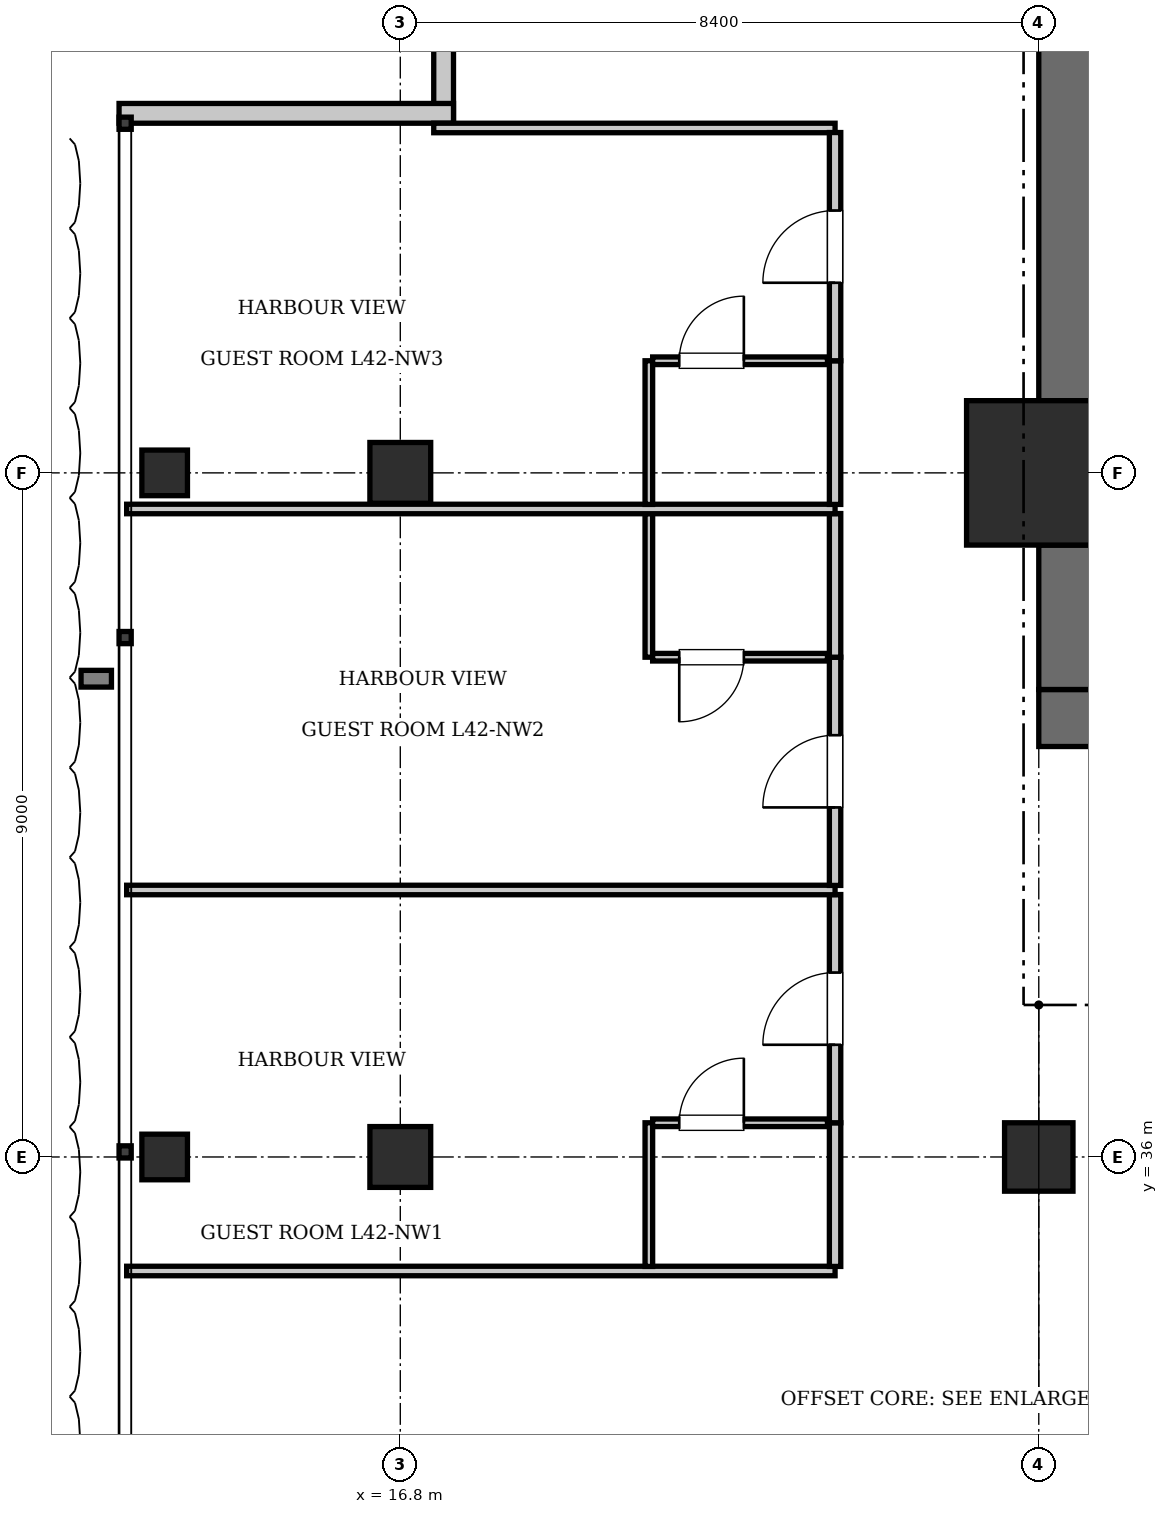
"""IFC4 building model, lengths in metres.
Left out: names, types, materials, properties, quantities, classifications, styles, units other than length and angle.
Written with IfcOpenShell. Run it as: python <this file> out.ifc"""

import sys

from ifc_helpers import new_model, si_unit, direction, frame, frame_2d, origin, origin_2d, place, context, subcontext, project, spatial, rectangle, i_section, extrude, element, fill, save


model = new_model("IFC4")
c1 = context("Model", 3, precision=1e-05, world=origin(), true_north=direction((0.0, 1.0)))
c2 = subcontext(c1, "Body", "Model", "MODEL_VIEW")
j1 = project(units=[si_unit("LENGTHUNIT", "METRE"), si_unit("PLANEANGLEUNIT", "RADIAN")], contexts=[c1])
p1 = place(None, origin())
s1 = spatial("IfcSite", under=j1, at=p1, CompositionType="ELEMENT")
p2 = place(p1, origin())
s2 = spatial("IfcBuilding", under=s1, at=p2, CompositionType="ELEMENT")
p3 = place(p2, frame((0.0, 0.0, 173.6)))
s3 = spatial("IfcBuildingStorey", under=s2, at=p3, CompositionType="ELEMENT", Elevation=173.6)
p4 = place(p3, frame((25.2, 45.0, 0.0), z_axis=(0.0, 0.0, 1.0), x_axis=(1.0, 0.0, 0.0)))
e1 = element("IfcColumn", 1, at=p4, inside=s3, PredefinedType="COLUMN", context=c2, shape_type="SweptSolid", body=[
    extrude(rectangle(XDim=1.9, YDim=1.9, at=origin_2d()), origin(), (0.0, 0.0, 1.0), 3.85),
])
p5 = place(p3, frame((25.2, 41.775, 0.0), z_axis=(0.0, 0.0, 1.0), x_axis=(1.0, 0.0, 0.0)))
e2 = element("IfcWall", 2, at=p5, inside=s3, PredefinedType="SHEAR", context=c2, shape_type="SweptSolid", body=[
    extrude(rectangle(XDim=6.8, YDim=0.75, at=frame_2d((3.4, 0.0))), origin(), (0.0, 0.0, 1.0), 3.85),
])
p6 = place(p5, frame((1.65, 0.0, 0.0)))
e3 = element("IfcOpeningElement", 3, at=p6, cuts=e2, PredefinedType="OPENING", context=c2, shape_type="SweptSolid", body=[
    extrude(rectangle(XDim=1.15, YDim=2.15, at=frame_2d((0.575, 1.075))), frame((0.0, 0.385, 0.0), z_axis=(0.0, -1.0, 0.0), x_axis=(1.0, 0.0, 0.0)), (0.0, 0.0, 1.0), 0.77),
])
p7 = place(p5, frame((5.15, 0.0, 0.0)))
e4 = element("IfcOpeningElement", 4, at=p7, cuts=e2, PredefinedType="OPENING", context=c2, shape_type="SweptSolid", body=[
    extrude(rectangle(XDim=1.1, YDim=2.2, at=frame_2d((0.55, 1.1))), frame((0.0, 0.385, 0.0), z_axis=(0.0, -1.0, 0.0), x_axis=(1.0, 0.0, 0.0)), (0.0, 0.0, 1.0), 0.77),
])
p8 = place(p3, frame((25.575, 42.15, 0.0), z_axis=(0.0, 0.0, 1.0), x_axis=(0.0, 1.0, 0.0)))
e5 = element("IfcWall", 5, at=p8, inside=s3, PredefinedType="SHEAR", context=c2, shape_type="SweptSolid", body=[
    extrude(rectangle(XDim=1.9, YDim=0.75, at=frame_2d((0.95, 0.0))), origin(), (0.0, 0.0, 1.0), 3.85),
])
p9 = place(p3, frame((25.575, 45.95, 0.0), z_axis=(0.0, 0.0, 1.0), x_axis=(0.0, 1.0, 0.0)))
e6 = element("IfcWall", 6, at=p9, inside=s3, PredefinedType="SHEAR", context=c2, shape_type="SweptSolid", body=[
    extrude(rectangle(XDim=7.3, YDim=0.75, at=frame_2d((3.65, 0.0))), origin(), (0.0, 0.0, 1.0), 3.85),
])
p10 = place(p3, frame((25.2, 36.0, 0.0), z_axis=(0.0, 0.0, 1.0), x_axis=(1.0, 0.0, 0.0)))
e7 = element("IfcColumn", 7, at=p10, inside=s3, PredefinedType="COLUMN", context=c2, shape_type="SweptSolid", body=[
    extrude(rectangle(XDim=0.9, YDim=0.9, at=origin_2d()), origin(), (0.0, 0.0, 1.0), 3.85),
])
for number, where, z_axis, x_axis in (
    (8, (16.8, 36.0, 0.0), (0.0, 0.0, 1.0), (1.0, 0.0, 0.0)),
    (9, (16.8, 45.0, 0.0), (0.0, 0.0, 1.0), (1.0, 0.0, 0.0)),
):
    element("IfcColumn", number, at=place(p3, frame(where, z_axis=z_axis, x_axis=x_axis)), inside=s3, PredefinedType="COLUMN", context=c2, shape_type="SweptSolid", body=[
        extrude(rectangle(XDim=0.8, YDim=0.8, at=origin_2d()), origin(), (0.0, 0.0, 1.0), 3.85),
    ])
for number, where, z_axis, x_axis in (
    (10, (13.7, 36.0, 0.0), (0.0, 0.0, 1.0), (1.0, 0.0, 0.0)),
    (11, (13.7, 45.0, 0.0), (0.0, 0.0, 1.0), (1.0, 0.0, 0.0)),
):
    element("IfcColumn", number, at=place(p3, frame(where, z_axis=z_axis, x_axis=x_axis)), inside=s3, PredefinedType="COLUMN", context=c2, shape_type="SweptSolid", body=[
        extrude(i_section(OverallWidth=0.6, OverallDepth=0.6, WebThickness=0.025, FlangeThickness=0.038, at=origin_2d()), origin(), (0.0, 0.0, 1.0), 3.85),
    ])
for number, where, z_axis, x_axis in (
    (12, (17.37, 49.6, 0.0), (0.0, 0.0, 1.0), (0.0, 1.0, 0.0)),
    (13, (13.1, 49.73, 0.0), (0.0, 0.0, 1.0), (1.0, 0.0, 0.0)),
):
    element("IfcWall", number, at=place(p3, frame(where, z_axis=z_axis, x_axis=x_axis)), inside=s3, PredefinedType="SOLIDWALL", context=c2, shape_type="SweptSolid", body=[
        extrude(rectangle(XDim=4.4, YDim=0.26, at=frame_2d((2.2, 0.0))), origin(), (0.0, 0.0, 1.0), 3.61),
    ])
p11 = place(p3, frame((13.2, 34.5, 0.0), z_axis=(0.0, 0.0, 1.0), x_axis=(1.0, 0.0, 0.0)))
e14 = element("IfcWall", 14, at=p11, inside=s3, PredefinedType="PARTITIONING", context=c2, shape_type="SweptSolid", body=[
    extrude(rectangle(XDim=9.32, YDim=0.125, at=frame_2d((4.66, 0.0))), origin(), (0.0, 0.0, 1.0), 3.61),
])
p12 = place(p3, frame((17.24, 49.538, 0.0), z_axis=(0.0, 0.0, 1.0), x_axis=(1.0, 0.0, 0.0)))
e15 = element("IfcWall", 15, at=p12, inside=s3, PredefinedType="PARTITIONING", context=c2, shape_type="SweptSolid", body=[
    extrude(rectangle(XDim=5.28, YDim=0.125, at=frame_2d((2.64, 0.0))), origin(), (0.0, 0.0, 1.0), 3.61),
])
p13 = place(p3, frame((22.52, 34.56, 0.0), z_axis=(0.0, 0.0, 1.0), x_axis=(0.0, 1.0, 0.0)))
e16 = element("IfcWall", 16, at=p13, inside=s3, PredefinedType="PARTITIONING", context=c2, shape_type="SweptSolid", body=[
    extrude(rectangle(XDim=1.89, YDim=0.15, at=frame_2d((0.945, 0.0))), origin(), (0.0, 0.0, 1.0), 3.61),
])
p14 = place(p3, frame((22.52, 36.45, 0.0), z_axis=(0.0, 0.0, 1.0), x_axis=(0.0, 1.0, 0.0)))
e17 = element("IfcWall", 17, at=p14, inside=s3, PredefinedType="PARTITIONING", context=c2, shape_type="SweptSolid", body=[
    extrude(rectangle(XDim=3.002, YDim=0.15, at=frame_2d((1.501, 0.0))), origin(), (0.0, 0.0, 1.0), 3.61),
])
p15 = place(p14, frame((1.026, 0.0, 0.0)))
e18 = element("IfcOpeningElement", 18, at=p15, cuts=e17, PredefinedType="OPENING", context=c2, shape_type="SweptSolid", body=[
    extrude(rectangle(XDim=0.95, YDim=2.15, at=frame_2d((0.475, 1.075))), frame((0.0, 0.085, 0.0), z_axis=(0.0, -1.0, 0.0), x_axis=(1.0, 0.0, 0.0)), (0.0, 0.0, 1.0), 0.17),
])
p16 = place(p3, frame((20.07, 34.56, 0.0), z_axis=(0.0, 0.0, 1.0), x_axis=(0.0, 1.0, 0.0)))
e19 = element("IfcWall", 19, at=p16, inside=s3, PredefinedType="PARTITIONING", context=c2, shape_type="SweptSolid", body=[
    extrude(rectangle(XDim=1.89, YDim=0.1, at=frame_2d((0.945, 0.0))), origin(), (0.0, 0.0, 1.0), 3.61),
])
p17 = place(p3, frame((20.12, 36.45, 0.0), z_axis=(0.0, 0.0, 1.0), x_axis=(1.0, 0.0, 0.0)))
e20 = element("IfcWall", 20, at=p17, inside=s3, PredefinedType="PARTITIONING", context=c2, shape_type="SweptSolid", body=[
    extrude(rectangle(XDim=2.3, YDim=0.1, at=frame_2d((1.15, 0.0))), origin(), (0.0, 0.0, 1.0), 3.61),
])
p18 = place(p17, frame((0.35, 0.0, 0.0)))
e21 = element("IfcOpeningElement", 21, at=p18, cuts=e20, PredefinedType="OPENING", context=c2, shape_type="SweptSolid", body=[
    extrude(rectangle(XDim=0.85, YDim=2.1, at=frame_2d((0.425, 1.05))), frame((0.0, 0.06, 0.0), z_axis=(0.0, -1.0, 0.0), x_axis=(1.0, 0.0, 0.0)), (0.0, 0.0, 1.0), 0.12),
])
p19 = place(p3, frame((13.2, 39.512, 0.0), z_axis=(0.0, 0.0, 1.0), x_axis=(1.0, 0.0, 0.0)))
e22 = element("IfcWall", 22, at=p19, inside=s3, PredefinedType="PARTITIONING", context=c2, shape_type="SweptSolid", body=[
    extrude(rectangle(XDim=9.32, YDim=0.125, at=frame_2d((4.66, 0.0))), origin(), (0.0, 0.0, 1.0), 3.61),
])
p20 = place(p3, frame((22.52, 39.573, 0.0), z_axis=(0.0, 0.0, 1.0), x_axis=(0.0, 1.0, 0.0)))
e23 = element("IfcWall", 23, at=p20, inside=s3, PredefinedType="PARTITIONING", context=c2, shape_type="SweptSolid", body=[
    extrude(rectangle(XDim=3.002, YDim=0.15, at=frame_2d((1.501, 0.0))), origin(), (0.0, 0.0, 1.0), 3.61),
])
p21 = place(p20, frame((1.026, 0.0, 0.0)))
e24 = element("IfcOpeningElement", 24, at=p21, cuts=e23, PredefinedType="OPENING", context=c2, shape_type="SweptSolid", body=[
    extrude(rectangle(XDim=0.95, YDim=2.15, at=frame_2d((0.475, 1.075))), frame((0.0, 0.085, 0.0), z_axis=(0.0, -1.0, 0.0), x_axis=(1.0, 0.0, 0.0)), (0.0, 0.0, 1.0), 0.17),
])
p22 = place(p3, frame((22.52, 42.575, 0.0), z_axis=(0.0, 0.0, 1.0), x_axis=(0.0, 1.0, 0.0)))
e25 = element("IfcWall", 25, at=p22, inside=s3, PredefinedType="PARTITIONING", context=c2, shape_type="SweptSolid", body=[
    extrude(rectangle(XDim=1.89, YDim=0.15, at=frame_2d((0.945, 0.0))), origin(), (0.0, 0.0, 1.0), 3.61),
])
p23 = place(p3, frame((20.07, 42.575, 0.0), z_axis=(0.0, 0.0, 1.0), x_axis=(0.0, 1.0, 0.0)))
e26 = element("IfcWall", 26, at=p23, inside=s3, PredefinedType="PARTITIONING", context=c2, shape_type="SweptSolid", body=[
    extrude(rectangle(XDim=1.89, YDim=0.1, at=frame_2d((0.945, 0.0))), origin(), (0.0, 0.0, 1.0), 3.61),
])
p24 = place(p3, frame((20.12, 42.575, 0.0), z_axis=(0.0, 0.0, 1.0), x_axis=(1.0, 0.0, 0.0)))
e27 = element("IfcWall", 27, at=p24, inside=s3, PredefinedType="PARTITIONING", context=c2, shape_type="SweptSolid", body=[
    extrude(rectangle(XDim=2.3, YDim=0.1, at=frame_2d((1.15, 0.0))), origin(), (0.0, 0.0, 1.0), 3.61),
])
p25 = place(p24, frame((0.35, 0.0, 0.0)))
e28 = element("IfcOpeningElement", 28, at=p25, cuts=e27, PredefinedType="OPENING", context=c2, shape_type="SweptSolid", body=[
    extrude(rectangle(XDim=0.85, YDim=2.1, at=frame_2d((0.425, 1.05))), frame((0.0, 0.06, 0.0), z_axis=(0.0, -1.0, 0.0), x_axis=(1.0, 0.0, 0.0)), (0.0, 0.0, 1.0), 0.12),
])
p26 = place(p3, frame((13.2, 44.525, 0.0), z_axis=(0.0, 0.0, 1.0), x_axis=(1.0, 0.0, 0.0)))
e29 = element("IfcWall", 29, at=p26, inside=s3, PredefinedType="PARTITIONING", context=c2, shape_type="SweptSolid", body=[
    extrude(rectangle(XDim=9.32, YDim=0.125, at=frame_2d((4.66, 0.0))), origin(), (0.0, 0.0, 1.0), 3.61),
])
p27 = place(p3, frame((22.52, 44.585, 0.0), z_axis=(0.0, 0.0, 1.0), x_axis=(0.0, 1.0, 0.0)))
e30 = element("IfcWall", 30, at=p27, inside=s3, PredefinedType="PARTITIONING", context=c2, shape_type="SweptSolid", body=[
    extrude(rectangle(XDim=1.89, YDim=0.15, at=frame_2d((0.945, 0.0))), origin(), (0.0, 0.0, 1.0), 3.61),
])
p28 = place(p3, frame((22.52, 46.475, 0.0), z_axis=(0.0, 0.0, 1.0), x_axis=(0.0, 1.0, 0.0)))
e31 = element("IfcWall", 31, at=p28, inside=s3, PredefinedType="PARTITIONING", context=c2, shape_type="SweptSolid", body=[
    extrude(rectangle(XDim=3.002, YDim=0.15, at=frame_2d((1.501, 0.0))), origin(), (0.0, 0.0, 1.0), 3.61),
])
p29 = place(p28, frame((1.026, 0.0, 0.0)))
e32 = element("IfcOpeningElement", 32, at=p29, cuts=e31, PredefinedType="OPENING", context=c2, shape_type="SweptSolid", body=[
    extrude(rectangle(XDim=0.95, YDim=2.15, at=frame_2d((0.475, 1.075))), frame((0.0, 0.085, 0.0), z_axis=(0.0, -1.0, 0.0), x_axis=(1.0, 0.0, 0.0)), (0.0, 0.0, 1.0), 0.17),
])
p30 = place(p3, frame((20.07, 44.585, 0.0), z_axis=(0.0, 0.0, 1.0), x_axis=(0.0, 1.0, 0.0)))
e33 = element("IfcWall", 33, at=p30, inside=s3, PredefinedType="PARTITIONING", context=c2, shape_type="SweptSolid", body=[
    extrude(rectangle(XDim=1.89, YDim=0.1, at=frame_2d((0.945, 0.0))), origin(), (0.0, 0.0, 1.0), 3.61),
])
p31 = place(p3, frame((20.12, 46.475, 0.0), z_axis=(0.0, 0.0, 1.0), x_axis=(1.0, 0.0, 0.0)))
e34 = element("IfcWall", 34, at=p31, inside=s3, PredefinedType="PARTITIONING", context=c2, shape_type="SweptSolid", body=[
    extrude(rectangle(XDim=2.3, YDim=0.1, at=frame_2d((1.15, 0.0))), origin(), (0.0, 0.0, 1.0), 3.61),
])
p32 = place(p31, frame((0.35, 0.0, 0.0)))
e35 = element("IfcOpeningElement", 35, at=p32, cuts=e34, PredefinedType="OPENING", context=c2, shape_type="SweptSolid", body=[
    extrude(rectangle(XDim=0.85, YDim=2.1, at=frame_2d((0.425, 1.05))), frame((0.0, 0.06, 0.0), z_axis=(0.0, -1.0, 0.0), x_axis=(1.0, 0.0, 0.0)), (0.0, 0.0, 1.0), 0.12),
])
p33 = place(p18, origin())
e36 = element("IfcDoor", 36, at=p33, inside=s3, OperationType="SINGLE_SWING_RIGHT", PredefinedType="DOOR", context=c2, shape_type="SweptSolid", body=[
    extrude(rectangle(XDim=0.85, YDim=2.1, at=frame_2d((0.425, 1.05))), frame((0.0, 0.025, 0.0), z_axis=(0.0, -1.0, 0.0), x_axis=(1.0, 0.0, 0.0)), (0.0, 0.0, 1.0), 0.05),
])
fill(e21, e36)
p34 = place(p15, origin())
e37 = element("IfcDoor", 37, at=p34, inside=s3, OperationType="SINGLE_SWING_LEFT", PredefinedType="DOOR", context=c2, shape_type="SweptSolid", body=[
    extrude(rectangle(XDim=0.95, YDim=2.15, at=frame_2d((0.475, 1.075))), frame((0.0, 0.025, 0.0), z_axis=(0.0, -1.0, 0.0), x_axis=(1.0, 0.0, 0.0)), (0.0, 0.0, 1.0), 0.05),
])
fill(e18, e37)
p35 = place(p25, frame((0.85, 0.0, 0.0), z_axis=(0.0, 0.0, 1.0), x_axis=(-1.0, 0.0, 0.0)))
e38 = element("IfcDoor", 38, at=p35, inside=s3, OperationType="SINGLE_SWING_RIGHT", PredefinedType="DOOR", context=c2, shape_type="SweptSolid", body=[
    extrude(rectangle(XDim=0.85, YDim=2.1, at=frame_2d((0.425, 1.05))), frame((0.0, 0.025, 0.0), z_axis=(0.0, -1.0, 0.0), x_axis=(1.0, 0.0, 0.0)), (0.0, 0.0, 1.0), 0.05),
])
fill(e28, e38)
p36 = place(p21, origin())
e39 = element("IfcDoor", 39, at=p36, inside=s3, OperationType="SINGLE_SWING_LEFT", PredefinedType="DOOR", context=c2, shape_type="SweptSolid", body=[
    extrude(rectangle(XDim=0.95, YDim=2.15, at=frame_2d((0.475, 1.075))), frame((0.0, 0.025, 0.0), z_axis=(0.0, -1.0, 0.0), x_axis=(1.0, 0.0, 0.0)), (0.0, 0.0, 1.0), 0.05),
])
fill(e24, e39)
p37 = place(p32, origin())
e40 = element("IfcDoor", 40, at=p37, inside=s3, OperationType="SINGLE_SWING_RIGHT", PredefinedType="DOOR", context=c2, shape_type="SweptSolid", body=[
    extrude(rectangle(XDim=0.85, YDim=2.1, at=frame_2d((0.425, 1.05))), frame((0.0, 0.025, 0.0), z_axis=(0.0, -1.0, 0.0), x_axis=(1.0, 0.0, 0.0)), (0.0, 0.0, 1.0), 0.05),
])
fill(e35, e40)
p38 = place(p29, origin())
e41 = element("IfcDoor", 41, at=p38, inside=s3, OperationType="SINGLE_SWING_LEFT", PredefinedType="DOOR", context=c2, shape_type="SweptSolid", body=[
    extrude(rectangle(XDim=0.95, YDim=2.15, at=frame_2d((0.475, 1.075))), frame((0.0, 0.025, 0.0), z_axis=(0.0, -1.0, 0.0), x_axis=(1.0, 0.0, 0.0)), (0.0, 0.0, 1.0), 0.05),
])
fill(e32, e41)
save(model, sys.argv[1])
